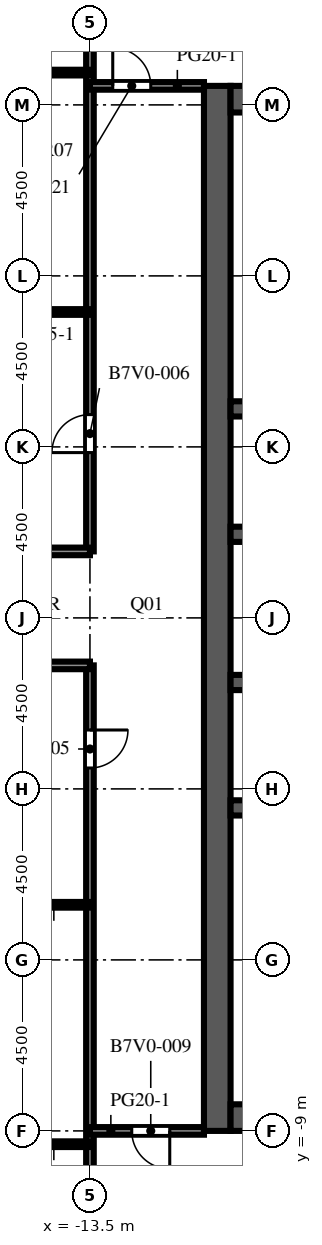
"""IFC4 building model, lengths in metres.
Left out: names, types, materials, properties, quantities, classifications, styles, units other than length and angle.
Written with IfcOpenShell. Run it as: python <this file> out.ifc"""

import sys

from ifc_helpers import new_model, si_unit, direction, frame, frame_2d, origin, place, context, subcontext, project, spatial, rectangle, extrude, element, fill, save


model = new_model("IFC4")
c1 = context("Model", 3, precision=1e-05, world=origin(), true_north=direction((0.0, 1.0)))
c2 = subcontext(c1, "Body", "Model", "MODEL_VIEW")
j1 = project(units=[si_unit("LENGTHUNIT", "METRE"), si_unit("PLANEANGLEUNIT", "RADIAN")], contexts=[c1])
p1 = place(None, origin())
s1 = spatial("IfcSite", under=j1, at=p1, CompositionType="ELEMENT")
p2 = place(p1, origin())
s2 = spatial("IfcBuilding", under=s1, at=p2, CompositionType="ELEMENT")
p3 = place(p2, frame((0.0, 0.0, 235.7)))
s3 = spatial("IfcBuildingStorey", under=s2, at=p3, CompositionType="ELEMENT", Elevation=235.7)
p4 = place(p3, frame((-10.15, -9.0, 0.0), z_axis=(0.0, 0.0, 1.0), x_axis=(0.0, 1.0, 0.0)))
e1 = element("IfcWall", 1, at=p4, inside=s3, PredefinedType="SHEAR", context=c2, shape_type="SweptSolid", body=[
    extrude(rectangle(XDim=27.5, YDim=0.7, at=frame_2d((13.75, 0.0))), origin(), (0.0, 0.0, 1.0), 4.1),
])
p5 = place(p4, frame((12.55, 0.0, 0.0)))
e2 = element("IfcOpeningElement", 2, at=p5, cuts=e1, PredefinedType="OPENING", context=c2, shape_type="SweptSolid", body=[
    extrude(rectangle(XDim=2.4, YDim=2.4, at=frame_2d((1.2, 1.2))), frame((0.0, 0.36, 0.0), z_axis=(0.0, -1.0, 0.0), x_axis=(1.0, 0.0, 0.0)), (0.0, 0.0, 1.0), 0.72),
])
p6 = place(p4, frame((6.825, 0.0, 0.0)))
e3 = element("IfcOpeningElement", 3, at=p6, cuts=e1, PredefinedType="OPENING", context=c2, shape_type="SweptSolid", body=[
    extrude(rectangle(XDim=1.2, YDim=2.1, at=frame_2d((0.6, 1.05))), frame((0.0, 0.36, 0.0), z_axis=(0.0, -1.0, 0.0), x_axis=(1.0, 0.0, 0.0)), (0.0, 0.0, 1.0), 0.72),
])
p7 = place(p4, frame((19.475, 0.0, 0.0)))
e4 = element("IfcOpeningElement", 4, at=p7, cuts=e1, PredefinedType="OPENING", context=c2, shape_type="SweptSolid", body=[
    extrude(rectangle(XDim=1.2, YDim=2.1, at=frame_2d((0.6, 1.05))), frame((0.0, 0.36, 0.0), z_axis=(0.0, -1.0, 0.0), x_axis=(1.0, 0.0, 0.0)), (0.0, 0.0, 1.0), 0.72),
])
for number, where, z_axis, x_axis in (
    (5, (-9.8, -8.65, 0.0), (0.0, 0.0, 1.0), (1.0, 0.0, 0.0)),
    (6, (-9.8, 18.15, 0.0), (0.0, 0.0, 1.0), (1.0, 0.0, 0.0)),
):
    element("IfcWall", number, at=place(p3, frame(where, z_axis=z_axis, x_axis=x_axis)), inside=s3, PredefinedType="SHEAR", context=c2, shape_type="SweptSolid", body=[
        extrude(rectangle(XDim=10.6, YDim=0.7, at=frame_2d((5.3, 0.0))), origin(), (0.0, 0.0, 1.0), 4.1),
    ])
p8 = place(p3, frame((-9.8, -0.5, 0.0), z_axis=(0.0, 0.0, 1.0), x_axis=(1.0, 0.0, 0.0)))
e7 = element("IfcWall", 7, at=p8, inside=s3, PredefinedType="SHEAR", context=c2, shape_type="SweptSolid", body=[
    extrude(rectangle(XDim=10.6, YDim=0.4, at=frame_2d((5.3, 0.0))), origin(), (0.0, 0.0, 1.0), 4.1),
])
p9 = place(p3, frame((-9.8, 2.8, 0.0), z_axis=(0.0, 0.0, 1.0), x_axis=(1.0, 0.0, 0.0)))
e8 = element("IfcWall", 8, at=p9, inside=s3, PredefinedType="SHEAR", context=c2, shape_type="SweptSolid", body=[
    extrude(rectangle(XDim=10.6, YDim=0.4, at=frame_2d((5.3, 0.0))), origin(), (0.0, 0.0, 1.0), 4.1),
])
p10 = place(p9, frame((0.688, 0.0, 0.0)))
e9 = element("IfcOpeningElement", 9, at=p10, cuts=e8, PredefinedType="OPENING", context=c2, shape_type="SweptSolid", body=[
    extrude(rectangle(XDim=1.1, YDim=2.1, at=frame_2d((0.55, 1.05))), frame((0.0, 0.21, 0.0), z_axis=(0.0, -1.0, 0.0), x_axis=(1.0, 0.0, 0.0)), (0.0, 0.0, 1.0), 0.42),
])
p11 = place(p9, frame((3.438, 0.0, 0.0)))
e10 = element("IfcOpeningElement", 10, at=p11, cuts=e8, PredefinedType="OPENING", context=c2, shape_type="SweptSolid", body=[
    extrude(rectangle(XDim=1.1, YDim=2.1, at=frame_2d((0.55, 1.05))), frame((0.0, 0.21, 0.0), z_axis=(0.0, -1.0, 0.0), x_axis=(1.0, 0.0, 0.0)), (0.0, 0.0, 1.0), 0.42),
])
p12 = place(p9, frame((6.113, 0.0, 0.0)))
e11 = element("IfcOpeningElement", 11, at=p12, cuts=e8, PredefinedType="OPENING", context=c2, shape_type="SweptSolid", body=[
    extrude(rectangle(XDim=1.0, YDim=2.1, at=frame_2d((0.5, 1.05))), frame((0.0, 0.21, 0.0), z_axis=(0.0, -1.0, 0.0), x_axis=(1.0, 0.0, 0.0)), (0.0, 0.0, 1.0), 0.42),
])
p13 = place(p9, frame((8.863, 0.0, 0.0)))
e12 = element("IfcOpeningElement", 12, at=p13, cuts=e8, PredefinedType="OPENING", context=c2, shape_type="SweptSolid", body=[
    extrude(rectangle(XDim=1.0, YDim=2.1, at=frame_2d((0.5, 1.05))), frame((0.0, 0.21, 0.0), z_axis=(0.0, -1.0, 0.0), x_axis=(1.0, 0.0, 0.0)), (0.0, 0.0, 1.0), 0.42),
])
p14 = place(p3, frame((-9.8, 6.7, 0.0), z_axis=(0.0, 0.0, 1.0), x_axis=(1.0, 0.0, 0.0)))
e13 = element("IfcWall", 13, at=p14, inside=s3, PredefinedType="SHEAR", context=c2, shape_type="SweptSolid", body=[
    extrude(rectangle(XDim=10.6, YDim=0.4, at=frame_2d((5.3, 0.0))), origin(), (0.0, 0.0, 1.0), 4.1),
])
p15 = place(p14, frame((3.438, 0.0, 0.0)))
e14 = element("IfcOpeningElement", 14, at=p15, cuts=e13, PredefinedType="OPENING", context=c2, shape_type="SweptSolid", body=[
    extrude(rectangle(XDim=1.1, YDim=2.1, at=frame_2d((0.55, 1.05))), frame((0.0, 0.21, 0.0), z_axis=(0.0, -1.0, 0.0), x_axis=(1.0, 0.0, 0.0)), (0.0, 0.0, 1.0), 0.42),
])
p16 = place(p14, frame((6.062, 0.0, 0.0)))
e15 = element("IfcOpeningElement", 15, at=p16, cuts=e13, PredefinedType="OPENING", context=c2, shape_type="SweptSolid", body=[
    extrude(rectangle(XDim=1.1, YDim=2.1, at=frame_2d((0.55, 1.05))), frame((0.0, 0.21, 0.0), z_axis=(0.0, -1.0, 0.0), x_axis=(1.0, 0.0, 0.0)), (0.0, 0.0, 1.0), 0.42),
])
p17 = place(p14, frame((8.812, 0.0, 0.0)))
e16 = element("IfcOpeningElement", 16, at=p17, cuts=e13, PredefinedType="OPENING", context=c2, shape_type="SweptSolid", body=[
    extrude(rectangle(XDim=1.1, YDim=2.1, at=frame_2d((0.55, 1.05))), frame((0.0, 0.21, 0.0), z_axis=(0.0, -1.0, 0.0), x_axis=(1.0, 0.0, 0.0)), (0.0, 0.0, 1.0), 0.42),
])
p18 = place(p14, frame((0.738, 0.0, 0.0)))
e17 = element("IfcOpeningElement", 17, at=p18, cuts=e13, PredefinedType="OPENING", context=c2, shape_type="SweptSolid", body=[
    extrude(rectangle(XDim=1.0, YDim=2.1, at=frame_2d((0.5, 1.05))), frame((0.0, 0.21, 0.0), z_axis=(0.0, -1.0, 0.0), x_axis=(1.0, 0.0, 0.0)), (0.0, 0.0, 1.0), 0.42),
])
p19 = place(p3, frame((-9.8, 10.0, 0.0), z_axis=(0.0, 0.0, 1.0), x_axis=(1.0, 0.0, 0.0)))
e18 = element("IfcWall", 18, at=p19, inside=s3, PredefinedType="SHEAR", context=c2, shape_type="SweptSolid", body=[
    extrude(rectangle(XDim=10.6, YDim=0.4, at=frame_2d((5.3, 0.0))), origin(), (0.0, 0.0, 1.0), 4.1),
])
p20 = place(p3, frame((-13.5, -22.077, 0.0), z_axis=(0.0, 0.0, 1.0), x_axis=(0.0, 1.0, 0.0)))
e19 = element("IfcWall", 19, at=p20, inside=s3, PredefinedType="PARTITIONING", context=c2, shape_type="SweptSolid", body=[
    extrude(rectangle(XDim=25.327, YDim=0.2, at=frame_2d((12.664, 0.0))), origin(), (0.0, 0.0, 1.0), 3.65),
])
p21 = place(p20, frame((22.627, 0.0, 0.0)))
e20 = element("IfcOpeningElement", 20, at=p21, cuts=e19, PredefinedType="OPENING", context=c2, shape_type="SweptSolid", body=[
    extrude(rectangle(XDim=1.0, YDim=2.1, at=frame_2d((0.5, 1.05))), frame((0.0, 0.11, 0.0), z_axis=(0.0, -1.0, 0.0), x_axis=(1.0, 0.0, 0.0)), (0.0, 0.0, 1.0), 0.22),
])
p22 = place(p3, frame((-13.5, 6.25, 0.0), z_axis=(0.0, 0.0, 1.0), x_axis=(0.0, 1.0, 0.0)))
e21 = element("IfcWall", 21, at=p22, inside=s3, PredefinedType="PARTITIONING", context=c2, shape_type="SweptSolid", body=[
    extrude(rectangle(XDim=24.827, YDim=0.2, at=frame_2d((12.414, 0.0))), origin(), (0.0, 0.0, 1.0), 3.65),
])
p23 = place(p22, frame((2.6, 0.0, 0.0)))
e22 = element("IfcOpeningElement", 22, at=p23, cuts=e21, PredefinedType="OPENING", context=c2, shape_type="SweptSolid", body=[
    extrude(rectangle(XDim=1.0, YDim=2.1, at=frame_2d((0.5, 1.05))), frame((0.0, 0.11, 0.0), z_axis=(0.0, -1.0, 0.0), x_axis=(1.0, 0.0, 0.0)), (0.0, 0.0, 1.0), 0.22),
])
p24 = place(p3, frame((-13.5, -9.35, 0.0), z_axis=(0.0, 0.0, 1.0), x_axis=(-1.0, 0.0, 0.0)))
e23 = element("IfcWall", 23, at=p24, inside=s3, PredefinedType="PARTITIONING", context=c2, shape_type="SweptSolid", body=[
    extrude(rectangle(XDim=4.1, YDim=0.15, at=frame_2d((2.05, 0.0))), origin(), (0.0, 0.0, 1.0), 3.65),
])
p25 = place(p24, frame((1.9, 0.0, 0.0)))
e24 = element("IfcOpeningElement", 24, at=p25, cuts=e23, PredefinedType="OPENING", context=c2, shape_type="SweptSolid", body=[
    extrude(rectangle(XDim=1.0, YDim=2.1, at=frame_2d((0.5, 1.05))), frame((0.0, 0.085, 0.0), z_axis=(0.0, -1.0, 0.0), x_axis=(1.0, 0.0, 0.0)), (0.0, 0.0, 1.0), 0.17),
])
p26 = place(p3, frame((-10.5, -9.0, 0.0), z_axis=(0.0, 0.0, 1.0), x_axis=(-1.0, 0.0, 0.0)))
e25 = element("IfcWall", 25, at=p26, inside=s3, PredefinedType="PARTITIONING", context=c2, shape_type="SweptSolid", body=[
    extrude(rectangle(XDim=3.0, YDim=0.2, at=frame_2d((1.5, 0.0))), origin(), (0.0, 0.0, 1.0), 3.65),
])
p27 = place(p26, frame((0.9, 0.0, 0.0)))
e26 = element("IfcOpeningElement", 26, at=p27, cuts=e25, PredefinedType="OPENING", context=c2, shape_type="SweptSolid", body=[
    extrude(rectangle(XDim=1.0, YDim=2.1, at=frame_2d((0.5, 1.05))), frame((0.0, 0.11, 0.0), z_axis=(0.0, -1.0, 0.0), x_axis=(1.0, 0.0, 0.0)), (0.0, 0.0, 1.0), 0.22),
])
p28 = place(p3, frame((-13.5, -3.05, 0.0), z_axis=(0.0, 0.0, 1.0), x_axis=(-1.0, 0.0, 0.0)))
e27 = element("IfcWall", 27, at=p28, inside=s3, PredefinedType="PARTITIONING", context=c2, shape_type="SweptSolid", body=[
    extrude(rectangle(XDim=4.35, YDim=0.15, at=frame_2d((2.175, 0.0))), origin(), (0.0, 0.0, 1.0), 3.65),
])
p29 = place(p28, frame((1.9, 0.0, 0.0)))
e28 = element("IfcOpeningElement", 28, at=p29, cuts=e27, PredefinedType="OPENING", context=c2, shape_type="SweptSolid", body=[
    extrude(rectangle(XDim=1.0, YDim=2.1, at=frame_2d((0.5, 1.05))), frame((0.0, 0.085, 0.0), z_axis=(0.0, -1.0, 0.0), x_axis=(1.0, 0.0, 0.0)), (0.0, 0.0, 1.0), 0.17),
])
for number, where, z_axis, x_axis in (
    (29, (-17.85, 3.25, 0.0), (0.0, 0.0, 1.0), (1.0, 0.0, 0.0)),
    (30, (-17.85, 6.25, 0.0), (0.0, 0.0, 1.0), (1.0, 0.0, 0.0)),
):
    element("IfcWall", number, at=place(p3, frame(where, z_axis=z_axis, x_axis=x_axis)), inside=s3, PredefinedType="PARTITIONING", context=c2, shape_type="SweptSolid", body=[
        extrude(rectangle(XDim=4.35, YDim=0.2, at=frame_2d((2.175, 0.0))), origin(), (0.0, 0.0, 1.0), 3.65),
    ])
p30 = place(p3, frame((-17.85, 12.55, 0.0), z_axis=(0.0, 0.0, 1.0), x_axis=(1.0, 0.0, 0.0)))
e31 = element("IfcWall", 31, at=p30, inside=s3, PredefinedType="PARTITIONING", context=c2, shape_type="SweptSolid", body=[
    extrude(rectangle(XDim=4.35, YDim=0.15, at=frame_2d((2.175, 0.0))), origin(), (0.0, 0.0, 1.0), 3.65),
])
p31 = place(p30, frame((0.95, 0.0, 0.0)))
e32 = element("IfcOpeningElement", 32, at=p31, cuts=e31, PredefinedType="OPENING", context=c2, shape_type="SweptSolid", body=[
    extrude(rectangle(XDim=1.0, YDim=2.1, at=frame_2d((0.5, 1.05))), frame((0.0, 0.085, 0.0), z_axis=(0.0, -1.0, 0.0), x_axis=(1.0, 0.0, 0.0)), (0.0, 0.0, 1.0), 0.17),
])
p32 = place(p3, frame((-13.5, 18.5, 0.0), z_axis=(0.0, 0.0, 1.0), x_axis=(1.0, 0.0, 0.0)))
e33 = element("IfcWall", 33, at=p32, inside=s3, PredefinedType="PARTITIONING", context=c2, shape_type="SweptSolid", body=[
    extrude(rectangle(XDim=3.0, YDim=0.2, at=frame_2d((1.5, 0.0))), origin(), (0.0, 0.0, 1.0), 3.65),
])
p33 = place(p32, frame((0.6, 0.0, 0.0)))
e34 = element("IfcOpeningElement", 34, at=p33, cuts=e33, PredefinedType="OPENING", context=c2, shape_type="SweptSolid", body=[
    extrude(rectangle(XDim=1.0, YDim=2.1, at=frame_2d((0.5, 1.05))), frame((0.0, 0.11, 0.0), z_axis=(0.0, -1.0, 0.0), x_axis=(1.0, 0.0, 0.0)), (0.0, 0.0, 1.0), 0.22),
])
p34 = place(p3, frame((-17.85, 18.85, 0.0), z_axis=(0.0, 0.0, 1.0), x_axis=(1.0, 0.0, 0.0)))
e35 = element("IfcWall", 35, at=p34, inside=s3, PredefinedType="PARTITIONING", context=c2, shape_type="SweptSolid", body=[
    extrude(rectangle(XDim=4.35, YDim=0.15, at=frame_2d((2.175, 0.0))), origin(), (0.0, 0.0, 1.0), 3.65),
])
p35 = place(p34, frame((1.7, 0.0, 0.0)))
e36 = element("IfcOpeningElement", 36, at=p35, cuts=e35, PredefinedType="OPENING", context=c2, shape_type="SweptSolid", body=[
    extrude(rectangle(XDim=1.0, YDim=2.1, at=frame_2d((0.5, 1.05))), frame((0.0, 0.085, 0.0), z_axis=(0.0, -1.0, 0.0), x_axis=(1.0, 0.0, 0.0)), (0.0, 0.0, 1.0), 0.17),
])
p36 = place(p5, origin())
e37 = element("IfcDoor", 37, at=p36, inside=s3, OperationType="DOUBLE_DOOR_DOUBLE_SWING", PredefinedType="DOOR", context=c2, shape_type="SweptSolid", body=[
    extrude(rectangle(XDim=2.4, YDim=2.4, at=frame_2d((1.2, 1.2))), frame((0.0, 0.025, 0.0), z_axis=(0.0, -1.0, 0.0), x_axis=(1.0, 0.0, 0.0)), (0.0, 0.0, 1.0), 0.05),
])
fill(e2, e37)
p37 = place(p6, origin())
e38 = element("IfcDoor", 38, at=p37, inside=s3, OperationType="SINGLE_SWING_LEFT", PredefinedType="DOOR", context=c2, shape_type="SweptSolid", body=[
    extrude(rectangle(XDim=1.2, YDim=2.1, at=frame_2d((0.6, 1.05))), frame((0.0, 0.025, 0.0), z_axis=(0.0, -1.0, 0.0), x_axis=(1.0, 0.0, 0.0)), (0.0, 0.0, 1.0), 0.05),
])
fill(e3, e38)
p38 = place(p7, origin())
e39 = element("IfcDoor", 39, at=p38, inside=s3, OperationType="SINGLE_SWING_LEFT", PredefinedType="DOOR", context=c2, shape_type="SweptSolid", body=[
    extrude(rectangle(XDim=1.2, YDim=2.1, at=frame_2d((0.6, 1.05))), frame((0.0, 0.025, 0.0), z_axis=(0.0, -1.0, 0.0), x_axis=(1.0, 0.0, 0.0)), (0.0, 0.0, 1.0), 0.05),
])
fill(e4, e39)
p39 = place(p21, origin())
e40 = element("IfcDoor", 40, at=p39, inside=s3, OperationType="SINGLE_SWING_RIGHT", PredefinedType="DOOR", context=c2, shape_type="SweptSolid", body=[
    extrude(rectangle(XDim=1.0, YDim=2.1, at=frame_2d((0.5, 1.05))), frame((0.0, 0.025, 0.0), z_axis=(0.0, -1.0, 0.0), x_axis=(1.0, 0.0, 0.0)), (0.0, 0.0, 1.0), 0.05),
])
fill(e20, e40)
p40 = place(p23, origin())
e41 = element("IfcDoor", 41, at=p40, inside=s3, OperationType="SINGLE_SWING_LEFT", PredefinedType="DOOR", context=c2, shape_type="SweptSolid", body=[
    extrude(rectangle(XDim=1.0, YDim=2.1, at=frame_2d((0.5, 1.05))), frame((0.0, 0.025, 0.0), z_axis=(0.0, -1.0, 0.0), x_axis=(1.0, 0.0, 0.0)), (0.0, 0.0, 1.0), 0.05),
])
fill(e22, e41)
p41 = place(p27, origin())
e42 = element("IfcDoor", 42, at=p41, inside=s3, OperationType="SINGLE_SWING_LEFT", PredefinedType="DOOR", context=c2, shape_type="SweptSolid", body=[
    extrude(rectangle(XDim=1.0, YDim=2.1, at=frame_2d((0.5, 1.05))), frame((0.0, 0.025, 0.0), z_axis=(0.0, -1.0, 0.0), x_axis=(1.0, 0.0, 0.0)), (0.0, 0.0, 1.0), 0.05),
])
fill(e26, e42)
p42 = place(p33, origin())
e43 = element("IfcDoor", 43, at=p42, inside=s3, OperationType="SINGLE_SWING_LEFT", PredefinedType="DOOR", context=c2, shape_type="SweptSolid", body=[
    extrude(rectangle(XDim=1.0, YDim=2.1, at=frame_2d((0.5, 1.05))), frame((0.0, 0.025, 0.0), z_axis=(0.0, -1.0, 0.0), x_axis=(1.0, 0.0, 0.0)), (0.0, 0.0, 1.0), 0.05),
])
fill(e34, e43)
save(model, sys.argv[1])
